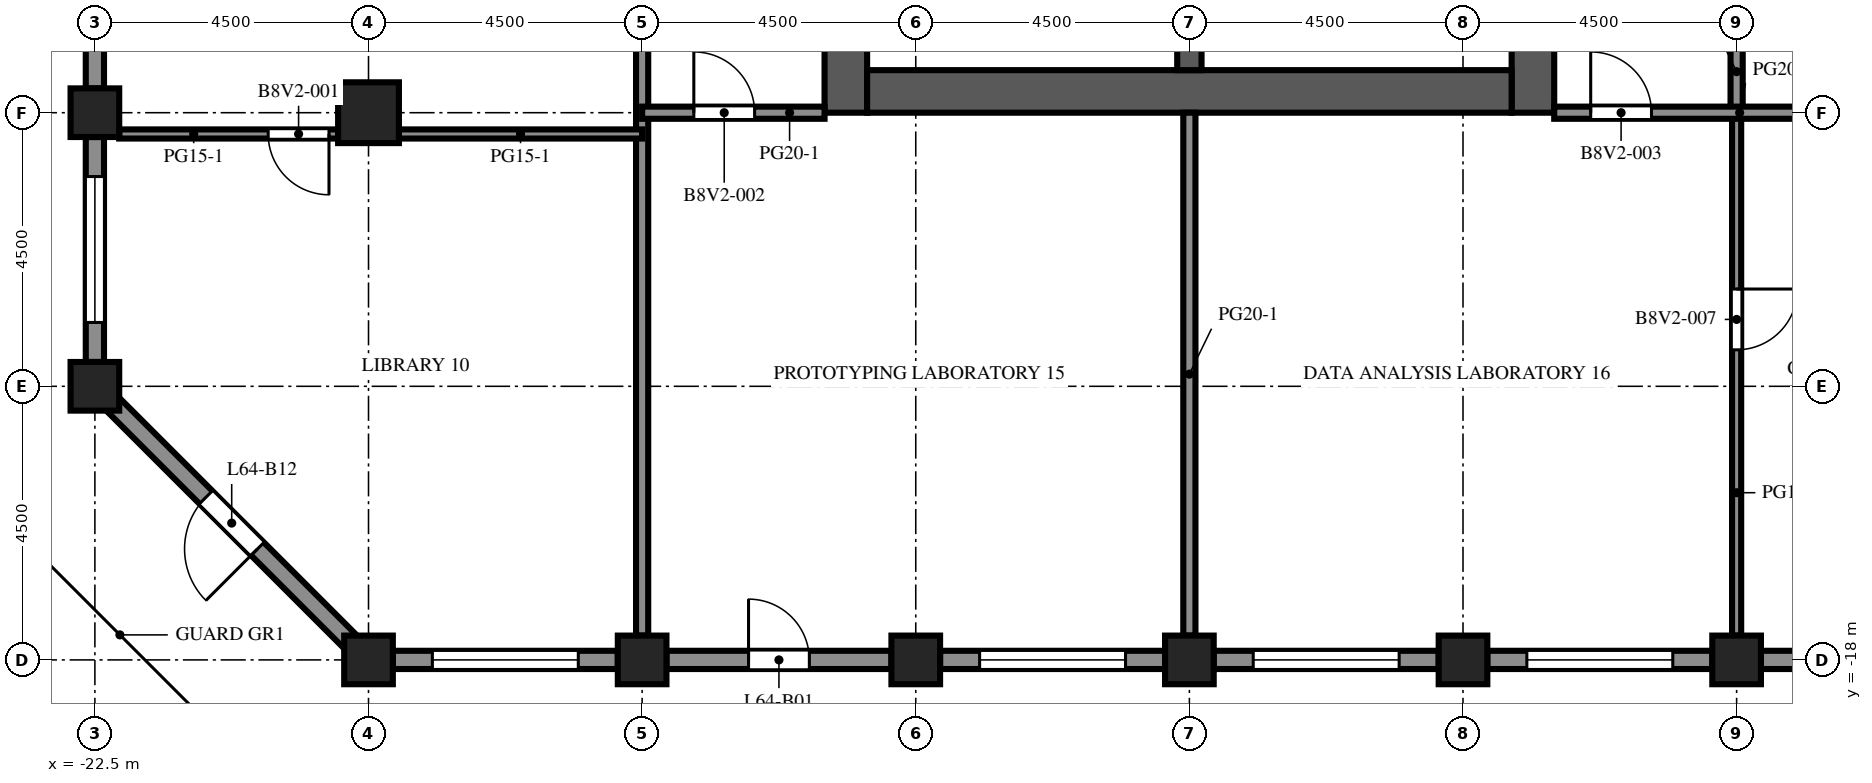
"""IFC4 building model, lengths in metres.
Left out: names, types, materials, properties, quantities, classifications, styles, units other than length and angle.
Written with IfcOpenShell. Run it as: python <this file> out.ifc"""

import sys

from ifc_helpers import new_model, si_unit, direction, frame, frame_2d, origin, origin_2d, place, context, subcontext, project, spatial, rectangle, extrude, element, fill, save


model = new_model("IFC4")
c1 = context("Model", 3, precision=1e-05, world=origin(), true_north=direction((0.0, 1.0)))
c2 = subcontext(c1, "Body", "Model", "MODEL_VIEW")
j1 = project(units=[si_unit("LENGTHUNIT", "METRE"), si_unit("PLANEANGLEUNIT", "RADIAN")], contexts=[c1])
p1 = place(None, origin())
s1 = spatial("IfcSite", under=j1, at=p1, CompositionType="ELEMENT")
p2 = place(p1, origin())
s2 = spatial("IfcBuilding", under=s1, at=p2, CompositionType="ELEMENT")
p3 = place(p2, frame((0.0, 0.0, 282.7)))
s3 = spatial("IfcBuildingStorey", under=s2, at=p3, CompositionType="ELEMENT", Elevation=282.7)
for number, where, z_axis, x_axis in (
    (1, (-22.5, -13.5, 0.0), (0.0, 0.0, 1.0), (1.0, 0.0, 0.0)),
    (2, (-22.5, -9.0, 0.0), (0.0, 0.0, 1.0), (1.0, 0.0, 0.0)),
    (3, (-18.0, -18.0, 0.0), (0.0, 0.0, 1.0), (1.0, 0.0, 0.0)),
    (4, (-13.5, -18.0, 0.0), (0.0, 0.0, 1.0), (1.0, 0.0, 0.0)),
    (5, (-9.0, -18.0, 0.0), (0.0, 0.0, 1.0), (1.0, 0.0, 0.0)),
    (6, (-4.5, -18.0, 0.0), (0.0, 0.0, 1.0), (1.0, 0.0, 0.0)),
    (7, (0.0, -18.0, 0.0), (0.0, 0.0, 1.0), (1.0, 0.0, 0.0)),
    (8, (4.5, -18.0, 0.0), (0.0, 0.0, 1.0), (1.0, 0.0, 0.0)),
):
    element("IfcColumn", number, at=place(p3, frame(where, z_axis=z_axis, x_axis=x_axis)), inside=s3, PredefinedType="COLUMN", context=c2, shape_type="SweptSolid", body=[
        extrude(rectangle(XDim=0.8, YDim=0.8, at=origin_2d()), origin(), (0.0, 0.0, 1.0), 4.1),
    ])
p4 = place(p3, frame((-18.0, -9.0, 0.0), z_axis=(0.0, 0.0, 1.0), x_axis=(1.0, 0.0, 0.0)))
e9 = element("IfcColumn", 9, at=p4, inside=s3, PredefinedType="COLUMN", context=c2, shape_type="SweptSolid", body=[
    extrude(rectangle(XDim=1.0, YDim=1.0, at=origin_2d()), origin(), (0.0, 0.0, 1.0), 4.1),
])
p5 = place(p3, frame((-10.15, -9.0, 0.0), z_axis=(0.0, 0.0, 1.0), x_axis=(0.0, 1.0, 0.0)))
e10 = element("IfcWall", 10, at=p5, inside=s3, PredefinedType="SHEAR", context=c2, shape_type="SweptSolid", body=[
    extrude(rectangle(XDim=27.5, YDim=0.7, at=frame_2d((13.75, 0.0))), origin(), (0.0, 0.0, 1.0), 4.1),
])
p6 = place(p5, frame((12.55, 0.0, 0.0)))
e11 = element("IfcOpeningElement", 11, at=p6, cuts=e10, PredefinedType="OPENING", context=c2, shape_type="SweptSolid", body=[
    extrude(rectangle(XDim=2.4, YDim=2.4, at=frame_2d((1.2, 1.2))), frame((0.0, 0.36, 0.0), z_axis=(0.0, -1.0, 0.0), x_axis=(1.0, 0.0, 0.0)), (0.0, 0.0, 1.0), 0.72),
])
p7 = place(p5, frame((6.825, 0.0, 0.0)))
e12 = element("IfcOpeningElement", 12, at=p7, cuts=e10, PredefinedType="OPENING", context=c2, shape_type="SweptSolid", body=[
    extrude(rectangle(XDim=1.2, YDim=2.1, at=frame_2d((0.6, 1.05))), frame((0.0, 0.36, 0.0), z_axis=(0.0, -1.0, 0.0), x_axis=(1.0, 0.0, 0.0)), (0.0, 0.0, 1.0), 0.72),
])
p8 = place(p5, frame((19.475, 0.0, 0.0)))
e13 = element("IfcOpeningElement", 13, at=p8, cuts=e10, PredefinedType="OPENING", context=c2, shape_type="SweptSolid", body=[
    extrude(rectangle(XDim=1.2, YDim=2.1, at=frame_2d((0.6, 1.05))), frame((0.0, 0.36, 0.0), z_axis=(0.0, -1.0, 0.0), x_axis=(1.0, 0.0, 0.0)), (0.0, 0.0, 1.0), 0.72),
])
p9 = place(p3, frame((1.15, -9.0, 0.0), z_axis=(0.0, 0.0, 1.0), x_axis=(0.0, 1.0, 0.0)))
e14 = element("IfcWall", 14, at=p9, inside=s3, PredefinedType="SHEAR", context=c2, shape_type="SweptSolid", body=[
    extrude(rectangle(XDim=27.5, YDim=0.7, at=frame_2d((13.75, 0.0))), origin(), (0.0, 0.0, 1.0), 4.1),
])
p10 = place(p9, frame((12.55, 0.0, 0.0)))
e15 = element("IfcOpeningElement", 15, at=p10, cuts=e14, PredefinedType="OPENING", context=c2, shape_type="SweptSolid", body=[
    extrude(rectangle(XDim=2.4, YDim=2.4, at=frame_2d((1.2, 1.2))), frame((0.0, 0.36, 0.0), z_axis=(0.0, -1.0, 0.0), x_axis=(1.0, 0.0, 0.0)), (0.0, 0.0, 1.0), 0.72),
])
p11 = place(p9, frame((3.9, 0.0, 0.0)))
e16 = element("IfcOpeningElement", 16, at=p11, cuts=e14, PredefinedType="OPENING", context=c2, shape_type="SweptSolid", body=[
    extrude(rectangle(XDim=1.2, YDim=2.1, at=frame_2d((0.6, 1.05))), frame((0.0, 0.36, 0.0), z_axis=(0.0, -1.0, 0.0), x_axis=(1.0, 0.0, 0.0)), (0.0, 0.0, 1.0), 0.72),
])
p12 = place(p9, frame((22.4, 0.0, 0.0)))
e17 = element("IfcOpeningElement", 17, at=p12, cuts=e14, PredefinedType="OPENING", context=c2, shape_type="SweptSolid", body=[
    extrude(rectangle(XDim=1.2, YDim=2.1, at=frame_2d((0.6, 1.05))), frame((0.0, 0.36, 0.0), z_axis=(0.0, -1.0, 0.0), x_axis=(1.0, 0.0, 0.0)), (0.0, 0.0, 1.0), 0.72),
])
p13 = place(p3, frame((-9.8, -8.65, 0.0), z_axis=(0.0, 0.0, 1.0), x_axis=(1.0, 0.0, 0.0)))
e18 = element("IfcWall", 18, at=p13, inside=s3, PredefinedType="SHEAR", context=c2, shape_type="SweptSolid", body=[
    extrude(rectangle(XDim=10.6, YDim=0.7, at=frame_2d((5.3, 0.0))), origin(), (0.0, 0.0, 1.0), 4.1),
])
p14 = place(p3, frame((-4.5, -8.3, 0.0), z_axis=(0.0, 0.0, 1.0), x_axis=(0.0, 1.0, 0.0)))
e19 = element("IfcWall", 19, at=p14, inside=s3, PredefinedType="SHEAR", context=c2, shape_type="SweptSolid", body=[
    extrude(rectangle(XDim=7.6, YDim=0.4, at=frame_2d((3.8, 0.0))), origin(), (0.0, 0.0, 1.0), 4.1),
])
p15 = place(p3, frame((-13.9, -18.0, 0.0), z_axis=(0.0, 0.0, 1.0), x_axis=(-1.0, 0.0, 0.0)))
e20 = element("IfcWall", 20, at=p15, inside=s3, PredefinedType="SOLIDWALL", context=c2, shape_type="SweptSolid", body=[
    extrude(rectangle(XDim=3.7, YDim=0.3, at=frame_2d((1.85, 0.0))), origin(), (0.0, 0.0, 1.0), 2.85),
])
p16 = place(p15, frame((0.65, 0.0, 0.8)))
e21 = element("IfcOpeningElement", 21, at=p16, cuts=e20, PredefinedType="OPENING", context=c2, shape_type="SweptSolid", body=[
    extrude(rectangle(XDim=2.4, YDim=1.7, at=frame_2d((1.2, 0.85))), frame((0.0, 0.16, 0.0), z_axis=(0.0, -1.0, 0.0), x_axis=(1.0, 0.0, 0.0)), (0.0, 0.0, 1.0), 0.32),
])
p17 = place(p3, frame((-9.4, -18.0, 0.0), z_axis=(0.0, 0.0, 1.0), x_axis=(-1.0, 0.0, 0.0)))
e22 = element("IfcWall", 22, at=p17, inside=s3, PredefinedType="SOLIDWALL", context=c2, shape_type="SweptSolid", body=[
    extrude(rectangle(XDim=3.7, YDim=0.3, at=frame_2d((1.85, 0.0))), origin(), (0.0, 0.0, 1.0), 2.85),
])
p18 = place(p17, frame((1.35, 0.0, 0.0)))
e23 = element("IfcOpeningElement", 23, at=p18, cuts=e22, PredefinedType="OPENING", context=c2, shape_type="SweptSolid", body=[
    extrude(rectangle(XDim=1.0, YDim=2.2, at=frame_2d((0.5, 1.1))), frame((0.0, 0.16, 0.0), z_axis=(0.0, -1.0, 0.0), x_axis=(1.0, 0.0, 0.0)), (0.0, 0.0, 1.0), 0.32),
])
p19 = place(p3, frame((-4.9, -18.0, 0.0), z_axis=(0.0, 0.0, 1.0), x_axis=(-1.0, 0.0, 0.0)))
e24 = element("IfcWall", 24, at=p19, inside=s3, PredefinedType="SOLIDWALL", context=c2, shape_type="SweptSolid", body=[
    extrude(rectangle(XDim=3.7, YDim=0.3, at=frame_2d((1.85, 0.0))), origin(), (0.0, 0.0, 1.0), 2.85),
])
p20 = place(p19, frame((0.65, 0.0, 0.8)))
e25 = element("IfcOpeningElement", 25, at=p20, cuts=e24, PredefinedType="OPENING", context=c2, shape_type="SweptSolid", body=[
    extrude(rectangle(XDim=2.4, YDim=1.7, at=frame_2d((1.2, 0.85))), frame((0.0, 0.16, 0.0), z_axis=(0.0, -1.0, 0.0), x_axis=(1.0, 0.0, 0.0)), (0.0, 0.0, 1.0), 0.32),
])
p21 = place(p3, frame((-0.4, -18.0, 0.0), z_axis=(0.0, 0.0, 1.0), x_axis=(-1.0, 0.0, 0.0)))
e26 = element("IfcWall", 26, at=p21, inside=s3, PredefinedType="SOLIDWALL", context=c2, shape_type="SweptSolid", body=[
    extrude(rectangle(XDim=3.7, YDim=0.3, at=frame_2d((1.85, 0.0))), origin(), (0.0, 0.0, 1.0), 2.85),
])
p22 = place(p21, frame((0.65, 0.0, 0.8)))
e27 = element("IfcOpeningElement", 27, at=p22, cuts=e26, PredefinedType="OPENING", context=c2, shape_type="SweptSolid", body=[
    extrude(rectangle(XDim=2.4, YDim=1.7, at=frame_2d((1.2, 0.85))), frame((0.0, 0.16, 0.0), z_axis=(0.0, -1.0, 0.0), x_axis=(1.0, 0.0, 0.0)), (0.0, 0.0, 1.0), 0.32),
])
p23 = place(p3, frame((4.1, -18.0, 0.0), z_axis=(0.0, 0.0, 1.0), x_axis=(-1.0, 0.0, 0.0)))
e28 = element("IfcWall", 28, at=p23, inside=s3, PredefinedType="SOLIDWALL", context=c2, shape_type="SweptSolid", body=[
    extrude(rectangle(XDim=3.7, YDim=0.3, at=frame_2d((1.85, 0.0))), origin(), (0.0, 0.0, 1.0), 2.85),
])
p24 = place(p23, frame((0.65, 0.0, 0.8)))
e29 = element("IfcOpeningElement", 29, at=p24, cuts=e28, PredefinedType="OPENING", context=c2, shape_type="SweptSolid", body=[
    extrude(rectangle(XDim=2.4, YDim=1.7, at=frame_2d((1.2, 0.85))), frame((0.0, 0.16, 0.0), z_axis=(0.0, -1.0, 0.0), x_axis=(1.0, 0.0, 0.0)), (0.0, 0.0, 1.0), 0.32),
])
p25 = place(p3, frame((8.6, -18.0, 0.0), z_axis=(0.0, 0.0, 1.0), x_axis=(-1.0, 0.0, 0.0)))
e30 = element("IfcWall", 30, at=p25, inside=s3, PredefinedType="SOLIDWALL", context=c2, shape_type="SweptSolid", body=[
    extrude(rectangle(XDim=3.7, YDim=0.3, at=frame_2d((1.85, 0.0))), origin(), (0.0, 0.0, 1.0), 2.85),
])
p26 = place(p25, frame((0.65, 0.0, 0.8)))
e31 = element("IfcOpeningElement", 31, at=p26, cuts=e30, PredefinedType="OPENING", context=c2, shape_type="SweptSolid", body=[
    extrude(rectangle(XDim=2.4, YDim=1.7, at=frame_2d((1.2, 0.85))), frame((0.0, 0.16, 0.0), z_axis=(0.0, -1.0, 0.0), x_axis=(1.0, 0.0, 0.0)), (0.0, 0.0, 1.0), 0.32),
])
p27 = place(p3, frame((-22.5, -8.6, 0.0), z_axis=(0.0, 0.0, 1.0), x_axis=(0.0, 1.0, 0.0)))
e32 = element("IfcWall", 32, at=p27, inside=s3, PredefinedType="SOLIDWALL", context=c2, shape_type="SweptSolid", body=[
    extrude(rectangle(XDim=3.7, YDim=0.3, at=frame_2d((1.85, 0.0))), origin(), (0.0, 0.0, 1.0), 2.85),
])
p28 = place(p27, frame((1.35, 0.0, 0.0)))
e33 = element("IfcOpeningElement", 33, at=p28, cuts=e32, PredefinedType="OPENING", context=c2, shape_type="SweptSolid", body=[
    extrude(rectangle(XDim=1.0, YDim=2.2, at=frame_2d((0.5, 1.1))), frame((0.0, 0.16, 0.0), z_axis=(0.0, -1.0, 0.0), x_axis=(1.0, 0.0, 0.0)), (0.0, 0.0, 1.0), 0.32),
])
p29 = place(p3, frame((-22.5, -13.1, 0.0), z_axis=(0.0, 0.0, 1.0), x_axis=(0.0, 1.0, 0.0)))
e34 = element("IfcWall", 34, at=p29, inside=s3, PredefinedType="SOLIDWALL", context=c2, shape_type="SweptSolid", body=[
    extrude(rectangle(XDim=3.7, YDim=0.3, at=frame_2d((1.85, 0.0))), origin(), (0.0, 0.0, 1.0), 2.85),
])
p30 = place(p29, frame((0.65, 0.0, 0.8)))
e35 = element("IfcOpeningElement", 35, at=p30, cuts=e34, PredefinedType="OPENING", context=c2, shape_type="SweptSolid", body=[
    extrude(rectangle(XDim=2.4, YDim=1.7, at=frame_2d((1.2, 0.85))), frame((0.0, 0.16, 0.0), z_axis=(0.0, -1.0, 0.0), x_axis=(1.0, 0.0, 0.0)), (0.0, 0.0, 1.0), 0.32),
])
p31 = place(p3, frame((-18.294, -17.706, 0.0), z_axis=(0.0, 0.0, 1.0), x_axis=(-0.707106781187, 0.707106781187, 0.0)))
e36 = element("IfcWall", 36, at=p31, inside=s3, PredefinedType="SOLIDWALL", context=c2, shape_type="SweptSolid", body=[
    extrude(rectangle(XDim=5.532, YDim=0.3, at=frame_2d((2.766, 0.0))), origin(), (0.0, 0.0, 1.0), 2.85),
])
p32 = place(p31, frame((2.166, 0.0, 0.0)))
e37 = element("IfcOpeningElement", 37, at=p32, cuts=e36, PredefinedType="OPENING", context=c2, shape_type="SweptSolid", body=[
    extrude(rectangle(XDim=1.2, YDim=2.2, at=frame_2d((0.6, 1.1))), frame((0.0, 0.16, 0.0), z_axis=(0.0, -1.0, 0.0), x_axis=(1.0, 0.0, 0.0)), (0.0, 0.0, 1.0), 0.32),
])
p33 = place(p3, frame((-0.7, -8.3, 0.0), z_axis=(0.0, 0.0, 1.0), x_axis=(0.0, 1.0, 0.0)))
e38 = element("IfcWall", 38, at=p33, inside=s3, PredefinedType="PARTITIONING", context=c2, shape_type="SweptSolid", body=[
    extrude(rectangle(XDim=2.28, YDim=0.1, at=frame_2d((1.14, 0.0))), origin(), (0.0, 0.0, 1.0), 3.65),
])
p34 = place(p33, frame((0.64, 0.0, 0.0)))
e39 = element("IfcOpeningElement", 39, at=p34, cuts=e38, PredefinedType="OPENING", context=c2, shape_type="SweptSolid", body=[
    extrude(rectangle(XDim=1.0, YDim=2.1, at=frame_2d((0.5, 1.05))), frame((0.0, 0.06, 0.0), z_axis=(0.0, -1.0, 0.0), x_axis=(1.0, 0.0, 0.0)), (0.0, 0.0, 1.0), 0.12),
])
p35 = place(p3, frame((-13.5, -17.6, 0.0), z_axis=(0.0, 0.0, 1.0), x_axis=(0.0, 1.0, 0.0)))
e40 = element("IfcWall", 40, at=p35, inside=s3, PredefinedType="PARTITIONING", context=c2, shape_type="SweptSolid", body=[
    extrude(rectangle(XDim=20.85, YDim=0.2, at=frame_2d((10.425, 0.0))), origin(), (0.0, 0.0, 1.0), 3.65),
])
p36 = place(p3, frame((-4.5, -17.6, 0.0), z_axis=(0.0, 0.0, 1.0), x_axis=(0.0, 1.0, 0.0)))
e41 = element("IfcWall", 41, at=p36, inside=s3, PredefinedType="PARTITIONING", context=c2, shape_type="SweptSolid", body=[
    extrude(rectangle(XDim=8.6, YDim=0.2, at=frame_2d((4.3, 0.0))), origin(), (0.0, 0.0, 1.0), 3.65),
])
p37 = place(p3, frame((4.5, -9.0, 0.0), z_axis=(0.0, 0.0, 1.0), x_axis=(0.0, -1.0, 0.0)))
e42 = element("IfcWall", 42, at=p37, inside=s3, PredefinedType="PARTITIONING", context=c2, shape_type="SweptSolid", body=[
    extrude(rectangle(XDim=8.6, YDim=0.15, at=frame_2d((4.3, 0.0))), origin(), (0.0, 0.0, 1.0), 3.65),
])
p38 = place(p37, frame((2.9, 0.0, 0.0)))
e43 = element("IfcOpeningElement", 43, at=p38, cuts=e42, PredefinedType="OPENING", context=c2, shape_type="SweptSolid", body=[
    extrude(rectangle(XDim=1.0, YDim=2.1, at=frame_2d((0.5, 1.05))), frame((0.0, 0.085, 0.0), z_axis=(0.0, -1.0, 0.0), x_axis=(1.0, 0.0, 0.0)), (0.0, 0.0, 1.0), 0.17),
])
p39 = place(p3, frame((4.5, -6.0, 0.0), z_axis=(0.0, 0.0, 1.0), x_axis=(0.0, -1.0, 0.0)))
e44 = element("IfcWall", 44, at=p39, inside=s3, PredefinedType="PARTITIONING", context=c2, shape_type="SweptSolid", body=[
    extrude(rectangle(XDim=3.0, YDim=0.2, at=frame_2d((1.5, 0.0))), origin(), (0.0, 0.0, 1.0), 3.65),
])
p40 = place(p39, frame((0.65, 0.0, 0.0)))
e45 = element("IfcOpeningElement", 45, at=p40, cuts=e44, PredefinedType="OPENING", context=c2, shape_type="SweptSolid", body=[
    extrude(rectangle(XDim=1.0, YDim=2.1, at=frame_2d((0.5, 1.05))), frame((0.0, 0.11, 0.0), z_axis=(0.0, -1.0, 0.0), x_axis=(1.0, 0.0, 0.0)), (0.0, 0.0, 1.0), 0.22),
])
p41 = place(p3, frame((-18.5, -9.35, 0.0), z_axis=(0.0, 0.0, 1.0), x_axis=(-1.0, 0.0, 0.0)))
e46 = element("IfcWall", 46, at=p41, inside=s3, PredefinedType="PARTITIONING", context=c2, shape_type="SweptSolid", body=[
    extrude(rectangle(XDim=3.6, YDim=0.15, at=frame_2d((1.8, 0.0))), origin(), (0.0, 0.0, 1.0), 3.65),
])
p42 = place(p41, frame((0.15, 0.0, 0.0)))
e47 = element("IfcOpeningElement", 47, at=p42, cuts=e46, PredefinedType="OPENING", context=c2, shape_type="SweptSolid", body=[
    extrude(rectangle(XDim=1.0, YDim=2.1, at=frame_2d((0.5, 1.05))), frame((0.0, 0.085, 0.0), z_axis=(0.0, -1.0, 0.0), x_axis=(1.0, 0.0, 0.0)), (0.0, 0.0, 1.0), 0.17),
])
p43 = place(p3, frame((-17.5, -9.35, 0.0), z_axis=(0.0, 0.0, 1.0), x_axis=(1.0, 0.0, 0.0)))
e48 = element("IfcWall", 48, at=p43, inside=s3, PredefinedType="PARTITIONING", context=c2, shape_type="SweptSolid", body=[
    extrude(rectangle(XDim=4.0, YDim=0.15, at=frame_2d((2.0, 0.0))), origin(), (0.0, 0.0, 1.0), 3.65),
])
p44 = place(p3, frame((-10.5, -9.0, 0.0), z_axis=(0.0, 0.0, 1.0), x_axis=(-1.0, 0.0, 0.0)))
e49 = element("IfcWall", 49, at=p44, inside=s3, PredefinedType="PARTITIONING", context=c2, shape_type="SweptSolid", body=[
    extrude(rectangle(XDim=3.0, YDim=0.2, at=frame_2d((1.5, 0.0))), origin(), (0.0, 0.0, 1.0), 3.65),
])
p45 = place(p44, frame((1.15, 0.0, 0.0)))
e50 = element("IfcOpeningElement", 50, at=p45, cuts=e49, PredefinedType="OPENING", context=c2, shape_type="SweptSolid", body=[
    extrude(rectangle(XDim=1.0, YDim=2.1, at=frame_2d((0.5, 1.05))), frame((0.0, 0.11, 0.0), z_axis=(0.0, -1.0, 0.0), x_axis=(1.0, 0.0, 0.0)), (0.0, 0.0, 1.0), 0.22),
])
p46 = place(p3, frame((6.0, -9.0, 0.0), z_axis=(0.0, 0.0, 1.0), x_axis=(-1.0, 0.0, 0.0)))
e51 = element("IfcWall", 51, at=p46, inside=s3, PredefinedType="PARTITIONING", context=c2, shape_type="SweptSolid", body=[
    extrude(rectangle(XDim=4.5, YDim=0.2, at=frame_2d((2.25, 0.0))), origin(), (0.0, 0.0, 1.0), 3.65),
])
p47 = place(p46, frame((2.9, 0.0, 0.0)))
e52 = element("IfcOpeningElement", 52, at=p47, cuts=e51, PredefinedType="OPENING", context=c2, shape_type="SweptSolid", body=[
    extrude(rectangle(XDim=1.0, YDim=2.1, at=frame_2d((0.5, 1.05))), frame((0.0, 0.11, 0.0), z_axis=(0.0, -1.0, 0.0), x_axis=(1.0, 0.0, 0.0)), (0.0, 0.0, 1.0), 0.22),
])
p48 = place(p16, origin())
e53 = element("IfcWindow", 53, at=p48, inside=s3, PartitioningType="SINGLE_PANEL", PredefinedType="WINDOW", context=c2, shape_type="SweptSolid", body=[
    extrude(rectangle(XDim=2.4, YDim=1.7, at=frame_2d((1.2, 0.85))), frame((0.0, 0.03, 0.0), z_axis=(0.0, -1.0, 0.0), x_axis=(1.0, 0.0, 0.0)), (0.0, 0.0, 1.0), 0.06),
])
fill(e21, e53)
p49 = place(p18, origin())
e54 = element("IfcDoor", 54, at=p49, inside=s3, OperationType="SINGLE_SWING_RIGHT", PredefinedType="DOOR", context=c2, shape_type="SweptSolid", body=[
    extrude(rectangle(XDim=1.0, YDim=2.2, at=frame_2d((0.5, 1.1))), frame((0.0, 0.025, 0.0), z_axis=(0.0, -1.0, 0.0), x_axis=(1.0, 0.0, 0.0)), (0.0, 0.0, 1.0), 0.05),
])
fill(e23, e54)
p50 = place(p20, origin())
e55 = element("IfcWindow", 55, at=p50, inside=s3, PartitioningType="SINGLE_PANEL", PredefinedType="WINDOW", context=c2, shape_type="SweptSolid", body=[
    extrude(rectangle(XDim=2.4, YDim=1.7, at=frame_2d((1.2, 0.85))), frame((0.0, 0.03, 0.0), z_axis=(0.0, -1.0, 0.0), x_axis=(1.0, 0.0, 0.0)), (0.0, 0.0, 1.0), 0.06),
])
fill(e25, e55)
p51 = place(p22, origin())
e56 = element("IfcWindow", 56, at=p51, inside=s3, PartitioningType="SINGLE_PANEL", PredefinedType="WINDOW", context=c2, shape_type="SweptSolid", body=[
    extrude(rectangle(XDim=2.4, YDim=1.7, at=frame_2d((1.2, 0.85))), frame((0.0, 0.03, 0.0), z_axis=(0.0, -1.0, 0.0), x_axis=(1.0, 0.0, 0.0)), (0.0, 0.0, 1.0), 0.06),
])
fill(e27, e56)
p52 = place(p24, origin())
e57 = element("IfcWindow", 57, at=p52, inside=s3, PartitioningType="SINGLE_PANEL", PredefinedType="WINDOW", context=c2, shape_type="SweptSolid", body=[
    extrude(rectangle(XDim=2.4, YDim=1.7, at=frame_2d((1.2, 0.85))), frame((0.0, 0.03, 0.0), z_axis=(0.0, -1.0, 0.0), x_axis=(1.0, 0.0, 0.0)), (0.0, 0.0, 1.0), 0.06),
])
fill(e29, e57)
p53 = place(p30, origin())
e58 = element("IfcWindow", 58, at=p53, inside=s3, PartitioningType="SINGLE_PANEL", PredefinedType="WINDOW", context=c2, shape_type="SweptSolid", body=[
    extrude(rectangle(XDim=2.4, YDim=1.7, at=frame_2d((1.2, 0.85))), frame((0.0, 0.03, 0.0), z_axis=(0.0, -1.0, 0.0), x_axis=(1.0, 0.0, 0.0)), (0.0, 0.0, 1.0), 0.06),
])
fill(e35, e58)
p54 = place(p32, origin())
e59 = element("IfcDoor", 59, at=p54, inside=s3, OperationType="SINGLE_SWING_LEFT", PredefinedType="DOOR", context=c2, shape_type="SweptSolid", body=[
    extrude(rectangle(XDim=1.2, YDim=2.2, at=frame_2d((0.6, 1.1))), frame((0.0, 0.025, 0.0), z_axis=(0.0, -1.0, 0.0), x_axis=(1.0, 0.0, 0.0)), (0.0, 0.0, 1.0), 0.05),
])
fill(e37, e59)
p55 = place(p42, origin())
e60 = element("IfcDoor", 60, at=p55, inside=s3, OperationType="SINGLE_SWING_LEFT", PredefinedType="DOOR", context=c2, shape_type="SweptSolid", body=[
    extrude(rectangle(XDim=1.0, YDim=2.1, at=frame_2d((0.5, 1.05))), frame((0.0, 0.025, 0.0), z_axis=(0.0, -1.0, 0.0), x_axis=(1.0, 0.0, 0.0)), (0.0, 0.0, 1.0), 0.05),
])
fill(e47, e60)
p56 = place(p45, origin())
e61 = element("IfcDoor", 61, at=p56, inside=s3, OperationType="SINGLE_SWING_RIGHT", PredefinedType="DOOR", context=c2, shape_type="SweptSolid", body=[
    extrude(rectangle(XDim=1.0, YDim=2.1, at=frame_2d((0.5, 1.05))), frame((0.0, 0.025, 0.0), z_axis=(0.0, -1.0, 0.0), x_axis=(1.0, 0.0, 0.0)), (0.0, 0.0, 1.0), 0.05),
])
fill(e50, e61)
p57 = place(p47, origin())
e62 = element("IfcDoor", 62, at=p57, inside=s3, OperationType="SINGLE_SWING_RIGHT", PredefinedType="DOOR", context=c2, shape_type="SweptSolid", body=[
    extrude(rectangle(XDim=1.0, YDim=2.1, at=frame_2d((0.5, 1.05))), frame((0.0, 0.025, 0.0), z_axis=(0.0, -1.0, 0.0), x_axis=(1.0, 0.0, 0.0)), (0.0, 0.0, 1.0), 0.05),
])
fill(e52, e62)
p58 = place(p38, origin())
e63 = element("IfcDoor", 63, at=p58, inside=s3, OperationType="SINGLE_SWING_LEFT", PredefinedType="DOOR", context=c2, shape_type="SweptSolid", body=[
    extrude(rectangle(XDim=1.0, YDim=2.1, at=frame_2d((0.5, 1.05))), frame((0.0, 0.025, 0.0), z_axis=(0.0, -1.0, 0.0), x_axis=(1.0, 0.0, 0.0)), (0.0, 0.0, 1.0), 0.05),
])
fill(e43, e63)
save(model, sys.argv[1])
